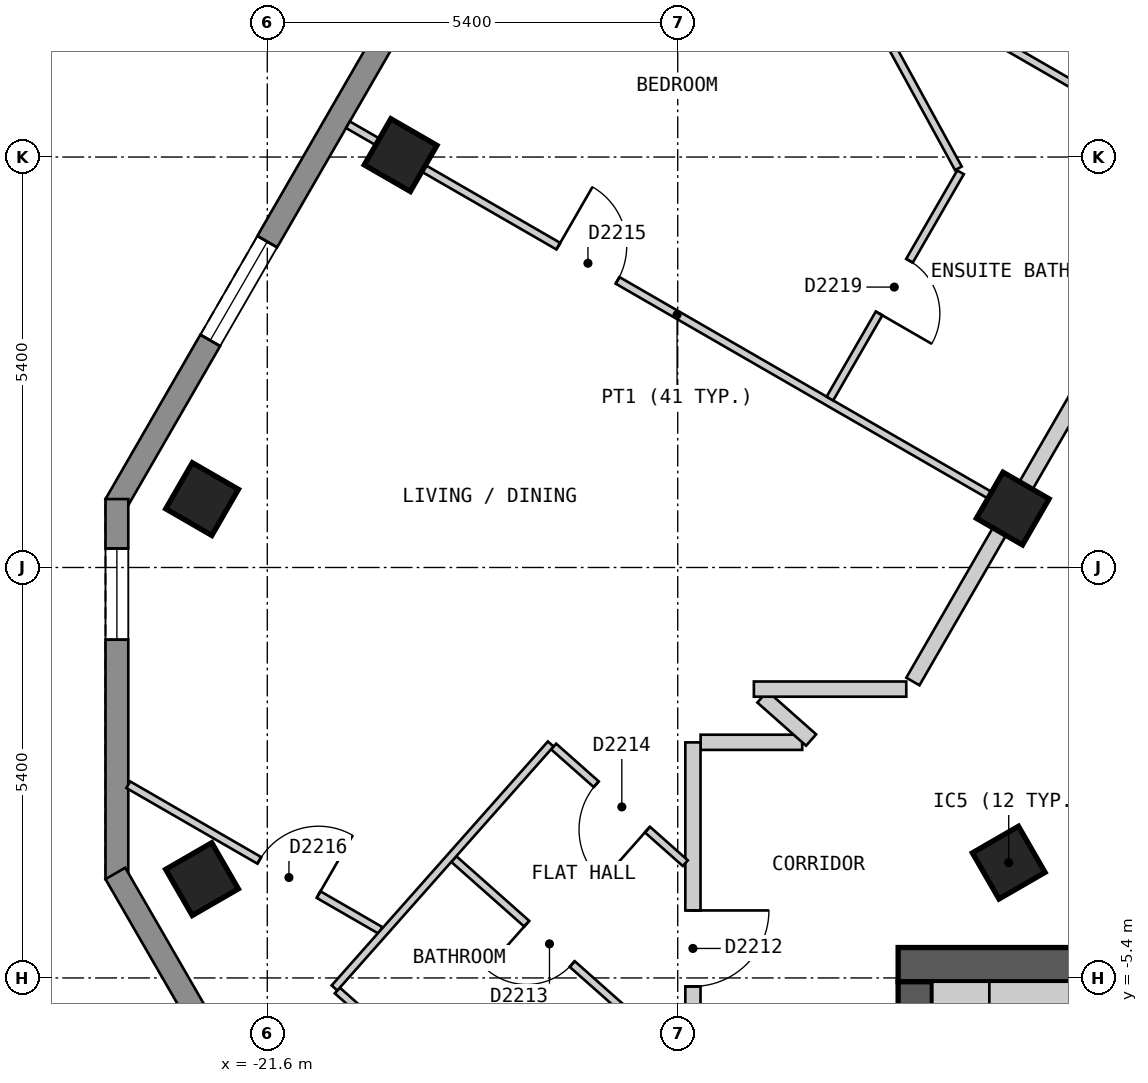
"""IFC4 building model, lengths in metres.
Left out: names, types, materials, properties, quantities, classifications, styles, units other than length and angle.
Written with IfcOpenShell. Run it as: python <this file> out.ifc"""

import sys

from ifc_helpers import new_model, si_unit, direction, frame, frame_2d, origin, origin_2d, place, context, subcontext, project, spatial, polyline, rectangle, outline, extrude, element, fill, save


model = new_model("IFC4")
c1 = context("Model", 3, precision=1e-05, world=origin(), true_north=direction((0.0, 1.0)))
c2 = subcontext(c1, "Body", "Model", "MODEL_VIEW")
j1 = project(units=[si_unit("LENGTHUNIT", "METRE"), si_unit("PLANEANGLEUNIT", "RADIAN")], contexts=[c1])
p1 = place(None, origin())
s1 = spatial("IfcSite", under=j1, at=p1, CompositionType="ELEMENT")
p2 = place(p1, origin())
s2 = spatial("IfcBuilding", under=s1, at=p2, CompositionType="ELEMENT")
p3 = place(p2, frame((0.0, 0.0, 235.8)))
s3 = spatial("IfcBuildingStorey", under=s2, at=p3, CompositionType="ELEMENT", Elevation=235.8)
for number, where, z_axis, x_axis in (
    (1, (-19.846, 5.425, 0.0), (0.0, 0.0, 1.0), (-0.5, -0.866, 0.0)),
    (2, (-22.458, 0.9, 0.0), (0.0, 0.0, 1.0), (-0.5, -0.866, 0.0)),
    (3, (-22.459, -4.1, 0.0), (0.0, 0.0, 1.0), (0.5, -0.866, 0.0)),
    (4, (-11.845, -3.883, 0.0), (0.0, 0.0, 1.0), (0.5, -0.866, 0.0)),
    (5, (-11.792, 0.775, 0.0), (0.0, 0.0, 1.0), (-0.5, -0.866, 0.0)),
):
    element("IfcColumn", number, at=place(p3, frame(where, z_axis=z_axis, x_axis=x_axis)), inside=s3, PredefinedType="COLUMN", context=c2, shape_type="SweptSolid", body=[
        extrude(rectangle(XDim=0.7, YDim=0.7, at=origin_2d()), origin(), (0.0, 0.0, 1.0), 3.0),
    ])
p4 = place(p3, frame((-13.3, -5.225, 0.0), z_axis=(0.0, 0.0, 1.0), x_axis=(1.0, 0.0, 0.0)))
e6 = element("IfcWall", 6, at=p4, inside=s3, PredefinedType="SHEAR", context=c2, shape_type="SweptSolid", body=[
    extrude(rectangle(XDim=26.6, YDim=0.45, at=frame_2d((13.3, 0.0))), origin(), (0.0, 0.0, 1.0), 2.7),
])
p5 = place(p4, frame((23.65, 0.0, 0.0)))
e7 = element("IfcOpeningElement", 7, at=p5, cuts=e6, PredefinedType="OPENING", context=c2, shape_type="SweptSolid", body=[
    extrude(rectangle(XDim=1.2, YDim=2.1, at=frame_2d((0.6, 1.05))), frame((0.0, 0.235, 0.0), z_axis=(0.0, -1.0, 0.0), x_axis=(1.0, 0.0, 0.0)), (0.0, 0.0, 1.0), 0.47),
])
p6 = place(p3, frame((-13.075, -18.55, 0.0), z_axis=(0.0, 0.0, 1.0), x_axis=(0.0, 1.0, 0.0)))
e8 = element("IfcWall", 8, at=p6, inside=s3, PredefinedType="SHEAR", context=c2, shape_type="SweptSolid", body=[
    extrude(rectangle(XDim=13.1, YDim=0.45, at=frame_2d((6.55, 0.0))), origin(), (0.0, 0.0, 1.0), 2.7),
])
p7 = place(p6, frame((4.35, 0.0, 0.0)))
e9 = element("IfcOpeningElement", 9, at=p7, cuts=e8, PredefinedType="OPENING", context=c2, shape_type="SweptSolid", body=[
    extrude(rectangle(XDim=1.2, YDim=2.1, at=frame_2d((0.6, 1.05))), frame((0.0, 0.235, 0.0), z_axis=(0.0, -1.0, 0.0), x_axis=(1.0, 0.0, 0.0)), (0.0, 0.0, 1.0), 0.47),
])
p8 = place(p3, frame((-12.514, 20.025, 0.0), z_axis=(0.0, 0.0, 1.0), x_axis=(-0.500003656944, -0.866023292436, 0.0)))
e10 = element("IfcWall", 10, at=p8, inside=s3, PredefinedType="SOLIDWALL", context=c2, shape_type="SweptSolid", body=[
    extrude(outline(polyline([(0.0, -0.15), (22.17, -0.15), (22.09, 0.15), (0.08, 0.15), (0.0, -0.15)])), origin(), (0.0, 0.0, 1.0), 2.7),
])
p9 = place(p8, frame((2.497, 0.0, 0.15)))
e11 = element("IfcOpeningElement", 11, at=p9, cuts=e10, PredefinedType="OPENING", context=c2, shape_type="SweptSolid", body=[
    extrude(rectangle(XDim=1.5, YDim=2.1, at=frame_2d((0.75, 1.05))), frame((0.0, 0.16, 0.0), z_axis=(0.0, -1.0, 0.0), x_axis=(1.0, 0.0, 0.0)), (0.0, 0.0, 1.0), 0.32),
])
p10 = place(p8, frame((7.722, 0.0, 0.15)))
e12 = element("IfcOpeningElement", 12, at=p10, cuts=e10, PredefinedType="OPENING", context=c2, shape_type="SweptSolid", body=[
    extrude(rectangle(XDim=1.5, YDim=2.1, at=frame_2d((0.75, 1.05))), frame((0.0, 0.16, 0.0), z_axis=(0.0, -1.0, 0.0), x_axis=(1.0, 0.0, 0.0)), (0.0, 0.0, 1.0), 0.32),
])
p11 = place(p8, frame((12.948, 0.0, 0.15)))
e13 = element("IfcOpeningElement", 13, at=p11, cuts=e10, PredefinedType="OPENING", context=c2, shape_type="SweptSolid", body=[
    extrude(rectangle(XDim=1.5, YDim=2.1, at=frame_2d((0.75, 1.05))), frame((0.0, 0.16, 0.0), z_axis=(0.0, -1.0, 0.0), x_axis=(1.0, 0.0, 0.0)), (0.0, 0.0, 1.0), 0.32),
])
p12 = place(p8, frame((18.173, 0.0, 0.15)))
e14 = element("IfcOpeningElement", 14, at=p12, cuts=e10, PredefinedType="OPENING", context=c2, shape_type="SweptSolid", body=[
    extrude(rectangle(XDim=1.5, YDim=2.1, at=frame_2d((0.75, 1.05))), frame((0.0, 0.16, 0.0), z_axis=(0.0, -1.0, 0.0), x_axis=(1.0, 0.0, 0.0)), (0.0, 0.0, 1.0), 0.32),
])
p13 = place(p3, frame((-23.579, 0.9, 0.0), z_axis=(0.0, 0.0, 1.0), x_axis=(0.0, -1.0, 0.0)))
e15 = element("IfcWall", 15, at=p13, inside=s3, PredefinedType="SOLIDWALL", context=c2, shape_type="SweptSolid", body=[
    extrude(outline(polyline([(0.0, -0.15), (5.0, -0.15), (4.92, 0.15), (0.08, 0.15), (0.0, -0.15)])), origin(), (0.0, 0.0, 1.0), 2.7),
])
p14 = place(p13, frame((0.65, 0.0, 0.15)))
e16 = element("IfcOpeningElement", 16, at=p14, cuts=e15, PredefinedType="OPENING", context=c2, shape_type="SweptSolid", body=[
    extrude(rectangle(XDim=1.2, YDim=2.1, at=frame_2d((0.6, 1.05))), frame((0.0, 0.16, 0.0), z_axis=(0.0, -1.0, 0.0), x_axis=(1.0, 0.0, 0.0)), (0.0, 0.0, 1.0), 0.32),
])
p15 = place(p3, frame((-23.599, -4.025, 0.0), z_axis=(0.0, 0.0, 1.0), x_axis=(0.500012653391, -0.866018098222, 0.0)))
e17 = element("IfcWall", 17, at=p15, inside=s3, PredefinedType="SOLIDWALL", context=c2, shape_type="SweptSolid", body=[
    extrude(outline(polyline([(0.0, -0.15), (16.628, -0.15), (16.548, 0.15), (0.08, 0.15), (0.0, -0.15)])), origin(), (0.0, 0.0, 1.0), 2.7),
])
p16 = place(p15, frame((2.444, 0.0, 0.15)))
e18 = element("IfcOpeningElement", 18, at=p16, cuts=e17, PredefinedType="OPENING", context=c2, shape_type="SweptSolid", body=[
    extrude(rectangle(XDim=1.5, YDim=2.1, at=frame_2d((0.75, 1.05))), frame((0.0, 0.16, 0.0), z_axis=(0.0, -1.0, 0.0), x_axis=(1.0, 0.0, 0.0)), (0.0, 0.0, 1.0), 0.32),
])
p17 = place(p15, frame((7.564, 0.0, 0.15)))
e19 = element("IfcOpeningElement", 19, at=p17, cuts=e17, PredefinedType="OPENING", context=c2, shape_type="SweptSolid", body=[
    extrude(rectangle(XDim=1.5, YDim=2.1, at=frame_2d((0.75, 1.05))), frame((0.0, 0.16, 0.0), z_axis=(0.0, -1.0, 0.0), x_axis=(1.0, 0.0, 0.0)), (0.0, 0.0, 1.0), 0.32),
])
p18 = place(p15, frame((12.682, 0.0, 0.15)))
e20 = element("IfcOpeningElement", 20, at=p18, cuts=e17, PredefinedType="OPENING", context=c2, shape_type="SweptSolid", body=[
    extrude(rectangle(XDim=1.5, YDim=2.1, at=frame_2d((0.75, 1.05))), frame((0.0, 0.16, 0.0), z_axis=(0.0, -1.0, 0.0), x_axis=(1.0, 0.0, 0.0)), (0.0, 0.0, 1.0), 0.32),
])
p19 = place(p3, frame((-15.899, -2.3, 0.0), z_axis=(0.0, 0.0, 1.0), x_axis=(1.0, 0.0, 0.0)))
e21 = element("IfcWall", 21, at=p19, inside=s3, PredefinedType="PARTITIONING", context=c2, shape_type="SweptSolid", body=[
    extrude(rectangle(XDim=1.337, YDim=0.2, at=frame_2d((0.668, 0.0))), origin(), (0.0, 0.0, 1.0), 2.7),
])
p20 = place(p3, frame((-13.106, -1.5, 0.0), z_axis=(0.0, 0.0, 1.0), x_axis=(0.500025705601, 0.86601056214, 0.0)))
e22 = element("IfcWall", 22, at=p20, inside=s3, PredefinedType="PARTITIONING", context=c2, shape_type="SweptSolid", body=[
    extrude(rectangle(XDim=7.735, YDim=0.2, at=frame_2d((3.868, 0.0))), origin(), (0.0, 0.0, 1.0), 2.7),
])
p21 = place(p3, frame((-16.0, -6.099, 0.0), z_axis=(0.0, 0.0, 1.0), x_axis=(0.0, 1.0, 0.0)))
e23 = element("IfcWall", 23, at=p21, inside=s3, PredefinedType="PARTITIONING", context=c2, shape_type="SweptSolid", body=[
    extrude(rectangle(XDim=3.798, YDim=0.2, at=frame_2d((1.899, 0.0))), origin(), (0.0, 0.0, 1.0), 2.7),
])
p22 = place(p21, frame((0.587, 0.0, 0.0)))
e24 = element("IfcOpeningElement", 24, at=p22, cuts=e23, PredefinedType="OPENING", context=c2, shape_type="SweptSolid", body=[
    extrude(rectangle(XDim=1.0, YDim=2.1, at=frame_2d((0.5, 1.05))), frame((0.0, 0.11, 0.0), z_axis=(0.0, -1.0, 0.0), x_axis=(1.0, 0.0, 0.0)), (0.0, 0.0, 1.0), 0.22),
])
p23 = place(p3, frame((-14.012, 8.0, 0.0), z_axis=(0.0, 0.0, 1.0), x_axis=(0.480183343847, -0.877168145963, 0.0)))
e25 = element("IfcWall", 25, at=p23, inside=s3, PredefinedType="PARTITIONING", context=c2, shape_type="SweptSolid", body=[
    extrude(rectangle(XDim=3.134, YDim=0.1, at=frame_2d((1.567, 0.0))), origin(), (0.0, 0.0, 1.0), 2.7),
])
p24 = place(p3, frame((-20.539, 5.825, 0.0), z_axis=(0.0, 0.0, 1.0), x_axis=(0.866089650643, -0.499888704662, 0.0)))
e26 = element("IfcWall", 26, at=p24, inside=s3, PredefinedType="PARTITIONING", context=c2, shape_type="SweptSolid", body=[
    extrude(rectangle(XDim=10.0, YDim=0.1, at=frame_2d((5.0, 0.0))), origin(), (0.0, 0.0, 1.0), 2.7),
])
p25 = place(p24, frame((3.196, 0.0, 0.0)))
e27 = element("IfcOpeningElement", 27, at=p25, cuts=e26, PredefinedType="OPENING", context=c2, shape_type="SweptSolid", body=[
    extrude(rectangle(XDim=0.9, YDim=2.1, at=frame_2d((0.45, 1.05))), frame((0.0, 0.06, 0.0), z_axis=(0.0, -1.0, 0.0), x_axis=(1.0, 0.0, 0.0)), (0.0, 0.0, 1.0), 0.12),
])
p26 = place(p3, frame((-23.429, -2.858, 0.0), z_axis=(0.0, 0.0, 1.0), x_axis=(0.8659754619, -0.500086491905, 0.0)))
e28 = element("IfcWall", 28, at=p26, inside=s3, PredefinedType="PARTITIONING", context=c2, shape_type="SweptSolid", body=[
    extrude(rectangle(XDim=3.831, YDim=0.1, at=frame_2d((1.916, 0.0))), origin(), (0.0, 0.0, 1.0), 2.7),
])
p27 = place(p26, frame((1.991, 0.0, 0.0)))
e29 = element("IfcOpeningElement", 29, at=p27, cuts=e28, PredefinedType="OPENING", context=c2, shape_type="SweptSolid", body=[
    extrude(rectangle(XDim=0.9, YDim=2.1, at=frame_2d((0.45, 1.05))), frame((0.0, 0.06, 0.0), z_axis=(0.0, -1.0, 0.0), x_axis=(1.0, 0.0, 0.0)), (0.0, 0.0, 1.0), 0.12),
])
p28 = place(p3, frame((-17.926, 10.35, 0.0), z_axis=(0.0, 0.0, 1.0), x_axis=(0.866018411306, -0.500012111133, 0.0)))
e30 = element("IfcWall", 30, at=p28, inside=s3, PredefinedType="PARTITIONING", context=c2, shape_type="SweptSolid", body=[
    extrude(rectangle(XDim=9.898, YDim=0.1, at=frame_2d((4.949, 0.0))), origin(), (0.0, 0.0, 1.0), 2.7),
])
p29 = place(p28, frame((1.83, 0.0, 0.0)))
e31 = element("IfcOpeningElement", 31, at=p29, cuts=e30, PredefinedType="OPENING", context=c2, shape_type="SweptSolid", body=[
    extrude(rectangle(XDim=0.9, YDim=2.1, at=frame_2d((0.45, 1.05))), frame((0.0, 0.06, 0.0), z_axis=(0.0, -1.0, 0.0), x_axis=(1.0, 0.0, 0.0)), (0.0, 0.0, 1.0), 0.12),
])
p30 = place(p3, frame((-17.833, -2.355, 0.0), z_axis=(0.0, 0.0, 1.0), x_axis=(0.748577710953, -0.663047065196, 0.0)))
e32 = element("IfcWall", 32, at=p30, inside=s3, PredefinedType="PARTITIONING", context=c2, shape_type="SweptSolid", body=[
    extrude(rectangle(XDim=2.315, YDim=0.1, at=frame_2d((1.157, 0.0))), origin(), (0.0, 0.0, 1.0), 2.7),
])
p31 = place(p30, frame((0.749, 0.0, 0.0)))
e33 = element("IfcOpeningElement", 33, at=p31, cuts=e32, PredefinedType="OPENING", context=c2, shape_type="SweptSolid", body=[
    extrude(rectangle(XDim=0.9, YDim=2.1, at=frame_2d((0.45, 1.05))), frame((0.0, 0.06, 0.0), z_axis=(0.0, -1.0, 0.0), x_axis=(1.0, 0.0, 0.0)), (0.0, 0.0, 1.0), 0.12),
])
p32 = place(p3, frame((-19.146, -3.836, 0.0), z_axis=(0.0, 0.0, 1.0), x_axis=(0.748267567437, -0.663397051186, 0.0)))
e34 = element("IfcWall", 34, at=p32, inside=s3, PredefinedType="PARTITIONING", context=c2, shape_type="SweptSolid", body=[
    extrude(rectangle(XDim=3.262, YDim=0.1, at=frame_2d((1.631, 0.0))), origin(), (0.0, 0.0, 1.0), 2.7),
])
p33 = place(p32, frame((1.282, 0.0, 0.0)))
e35 = element("IfcOpeningElement", 35, at=p33, cuts=e34, PredefinedType="OPENING", context=c2, shape_type="SweptSolid", body=[
    extrude(rectangle(XDim=0.8, YDim=2.1, at=frame_2d((0.4, 1.05))), frame((0.0, 0.06, 0.0), z_axis=(0.0, -1.0, 0.0), x_axis=(1.0, 0.0, 0.0)), (0.0, 0.0, 1.0), 0.12),
])
p34 = place(p3, frame((-20.679, -5.565, 0.0), z_axis=(0.0, 0.0, 1.0), x_axis=(0.748495475416, -0.663139897217, 0.0)))
e36 = element("IfcWall", 36, at=p34, inside=s3, PredefinedType="PARTITIONING", context=c2, shape_type="SweptSolid", body=[
    extrude(rectangle(XDim=2.577, YDim=0.1, at=frame_2d((1.289, 0.0))), origin(), (0.0, 0.0, 1.0), 2.7),
])
p35 = place(p3, frame((-14.198, 2.222, 0.0), z_axis=(0.0, 0.0, 1.0), x_axis=(0.500042121486, 0.866001083567, 0.0)))
e37 = element("IfcWall", 37, at=p35, inside=s3, PredefinedType="PARTITIONING", context=c2, shape_type="SweptSolid", body=[
    extrude(rectangle(XDim=3.438, YDim=0.1, at=frame_2d((1.719, 0.0))), origin(), (0.0, 0.0, 1.0), 2.7),
])
p36 = place(p35, frame((1.294, 0.0, 0.0)))
e38 = element("IfcOpeningElement", 38, at=p36, cuts=e37, PredefinedType="OPENING", context=c2, shape_type="SweptSolid", body=[
    extrude(rectangle(XDim=0.8, YDim=2.1, at=frame_2d((0.4, 1.05))), frame((0.0, 0.06, 0.0), z_axis=(0.0, -1.0, 0.0), x_axis=(1.0, 0.0, 0.0)), (0.0, 0.0, 1.0), 0.12),
])
p37 = place(p3, frame((-20.716, -5.532, 0.0), z_axis=(0.0, 0.0, 1.0), x_axis=(0.663278535613, 0.748372623895, 0.0)))
e39 = element("IfcWall", 39, at=p37, inside=s3, PredefinedType="PARTITIONING", context=c2, shape_type="SweptSolid", body=[
    extrude(rectangle(XDim=4.289, YDim=0.1, at=frame_2d((2.145, 0.0))), origin(), (0.0, 0.0, 1.0), 2.7),
])
p38 = place(p3, frame((-15.086, -1.702, 0.0), z_axis=(0.0, 0.0, 1.0), x_axis=(0.748305129876, -0.663354680846, 0.0)))
e40 = element("IfcWall", 40, at=p38, inside=s3, PredefinedType="PARTITIONING", context=c2, shape_type="SweptSolid", body=[
    extrude(rectangle(XDim=0.856, YDim=0.2, at=frame_2d((0.428, 0.0))), origin(), (0.0, 0.0, 1.0), 2.7),
])
p39 = place(p3, frame((-15.198, -1.6, 0.0), z_axis=(0.0, 0.0, 1.0), x_axis=(1.0, 0.0, 0.0)))
e41 = element("IfcWall", 41, at=p39, inside=s3, PredefinedType="PARTITIONING", context=c2, shape_type="SweptSolid", body=[
    extrude(rectangle(XDim=2.005, YDim=0.2, at=frame_2d((1.002, 0.0))), origin(), (0.0, 0.0, 1.0), 2.7),
])
p40 = place(p3, frame((-12.475, -9.15, 0.0), z_axis=(0.0, 0.0, 1.0), x_axis=(0.0, 1.0, 0.0)))
e42 = element("IfcWall", 42, at=p40, inside=s3, PredefinedType="SOLIDWALL", context=c2, shape_type="SweptSolid", body=[
    extrude(rectangle(XDim=3.7, YDim=0.75, at=frame_2d((1.85, 0.0))), origin(), (0.0, 0.0, 1.0), 2.7),
])
p41 = place(p3, frame((-12.1, -5.825, 0.0), z_axis=(0.0, 0.0, 1.0), x_axis=(1.0, 0.0, 0.0)))
e43 = element("IfcWall", 43, at=p41, inside=s3, PredefinedType="SOLIDWALL", context=c2, shape_type="SweptSolid", body=[
    extrude(rectangle(XDim=5.4, YDim=0.75, at=frame_2d((2.7, 0.0))), origin(), (0.0, 0.0, 1.0), 2.7),
])
p42 = place(p12, origin())
e44 = element("IfcWindow", 44, at=p42, inside=s3, PartitioningType="SINGLE_PANEL", PredefinedType="WINDOW", context=c2, shape_type="SweptSolid", body=[
    extrude(rectangle(XDim=1.5, YDim=2.1, at=frame_2d((0.75, 1.05))), frame((0.0, 0.03, 0.0), z_axis=(0.0, -1.0, 0.0), x_axis=(1.0, 0.0, 0.0)), (0.0, 0.0, 1.0), 0.06),
])
fill(e14, e44)
p43 = place(p14, origin())
e45 = element("IfcWindow", 45, at=p43, inside=s3, PartitioningType="SINGLE_PANEL", PredefinedType="WINDOW", context=c2, shape_type="SweptSolid", body=[
    extrude(rectangle(XDim=1.2, YDim=2.1, at=frame_2d((0.6, 1.05))), frame((0.0, 0.03, 0.0), z_axis=(0.0, -1.0, 0.0), x_axis=(1.0, 0.0, 0.0)), (0.0, 0.0, 1.0), 0.06),
])
fill(e16, e45)
p44 = place(p22, origin())
e46 = element("IfcDoor", 46, at=p44, inside=s3, OperationType="SINGLE_SWING_RIGHT", PredefinedType="DOOR", context=c2, shape_type="SweptSolid", body=[
    extrude(rectangle(XDim=1.0, YDim=2.1, at=frame_2d((0.5, 1.05))), frame((0.0, 0.025, 0.0), z_axis=(0.0, -1.0, 0.0), x_axis=(1.0, 0.0, 0.0)), (0.0, 0.0, 1.0), 0.05),
])
fill(e24, e46)
p45 = place(p33, origin())
e47 = element("IfcDoor", 47, at=p45, inside=s3, OperationType="SINGLE_SWING_LEFT", PredefinedType="DOOR", context=c2, shape_type="SweptSolid", body=[
    extrude(rectangle(XDim=0.8, YDim=2.1, at=frame_2d((0.4, 1.05))), frame((0.0, 0.025, 0.0), z_axis=(0.0, -1.0, 0.0), x_axis=(1.0, 0.0, 0.0)), (0.0, 0.0, 1.0), 0.05),
])
fill(e35, e47)
p46 = place(p31, origin())
e48 = element("IfcDoor", 48, at=p46, inside=s3, OperationType="SINGLE_SWING_RIGHT", PredefinedType="DOOR", context=c2, shape_type="SweptSolid", body=[
    extrude(rectangle(XDim=0.9, YDim=2.1, at=frame_2d((0.45, 1.05))), frame((0.0, 0.025, 0.0), z_axis=(0.0, -1.0, 0.0), x_axis=(1.0, 0.0, 0.0)), (0.0, 0.0, 1.0), 0.05),
])
fill(e33, e48)
p47 = place(p25, origin())
e49 = element("IfcDoor", 49, at=p47, inside=s3, OperationType="SINGLE_SWING_LEFT", PredefinedType="DOOR", context=c2, shape_type="SweptSolid", body=[
    extrude(rectangle(XDim=0.9, YDim=2.1, at=frame_2d((0.45, 1.05))), frame((0.0, 0.025, 0.0), z_axis=(0.0, -1.0, 0.0), x_axis=(1.0, 0.0, 0.0)), (0.0, 0.0, 1.0), 0.05),
])
fill(e27, e49)
p48 = place(p27, origin())
e50 = element("IfcDoor", 50, at=p48, inside=s3, OperationType="SINGLE_SWING_RIGHT", PredefinedType="DOOR", context=c2, shape_type="SweptSolid", body=[
    extrude(rectangle(XDim=0.9, YDim=2.1, at=frame_2d((0.45, 1.05))), frame((0.0, 0.025, 0.0), z_axis=(0.0, -1.0, 0.0), x_axis=(1.0, 0.0, 0.0)), (0.0, 0.0, 1.0), 0.05),
])
fill(e29, e50)
p49 = place(p36, origin())
e51 = element("IfcDoor", 51, at=p49, inside=s3, OperationType="SINGLE_SWING_LEFT", PredefinedType="DOOR", context=c2, shape_type="SweptSolid", body=[
    extrude(rectangle(XDim=0.8, YDim=2.1, at=frame_2d((0.4, 1.05))), frame((0.0, 0.025, 0.0), z_axis=(0.0, -1.0, 0.0), x_axis=(1.0, 0.0, 0.0)), (0.0, 0.0, 1.0), 0.05),
])
fill(e38, e51)
save(model, sys.argv[1])
